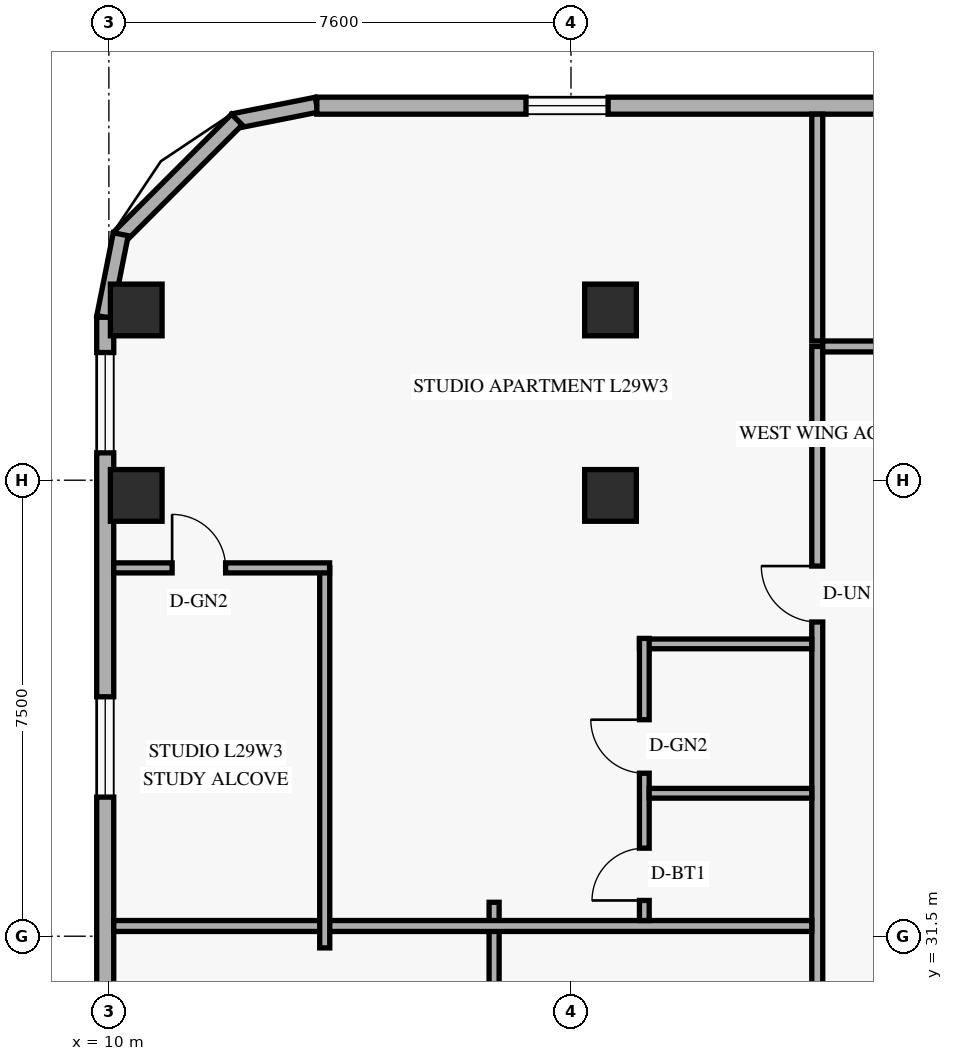
"""IFC4 building model, lengths in metres.
Left out: names, types, materials, properties, quantities, classifications, styles, units other than length and angle.
Written with IfcOpenShell. Run it as: python <this file> out.ifc"""

import sys

from ifc_helpers import new_model, si_unit, direction, frame, frame_2d, origin, origin_2d, place, context, subcontext, project, spatial, rectangle, extrude, element, fill, save


model = new_model("IFC4")
c1 = context("Model", 3, precision=1e-05, world=origin(), true_north=direction((0.0, 1.0)))
c2 = subcontext(c1, "Body", "Model", "MODEL_VIEW")
j1 = project(units=[si_unit("LENGTHUNIT", "METRE"), si_unit("PLANEANGLEUNIT", "RADIAN")], contexts=[c1])
p1 = place(None, origin())
s1 = spatial("IfcSite", under=j1, at=p1, CompositionType="ELEMENT")
p2 = place(p1, origin())
s2 = spatial("IfcBuilding", under=s1, at=p2, CompositionType="ELEMENT")
p3 = place(p2, frame((0.0, 0.0, 113.4)))
s3 = spatial("IfcBuildingStorey", under=s2, at=p3, CompositionType="ELEMENT", Elevation=113.4)
for number, where, z_axis, x_axis in (
    (1, (10.45, 38.75, 0.0), (0.0, 0.0, 1.0), (1.0, 0.0, 0.0)),
    (2, (10.45, 41.8, 0.0), (0.0, 0.0, 1.0), (1.0, 0.0, 0.0)),
    (3, (18.25, 38.75, 0.0), (0.0, 0.0, 1.0), (1.0, 0.0, 0.0)),
    (4, (18.25, 41.8, 0.0), (0.0, 0.0, 1.0), (1.0, 0.0, 0.0)),
):
    element("IfcColumn", number, at=place(p3, frame(where, z_axis=z_axis, x_axis=x_axis)), inside=s3, PredefinedType="COLUMN", context=c2, shape_type="SweptSolid", body=[
        extrude(rectangle(XDim=0.85, YDim=0.85, at=origin_2d()), origin(), (0.0, 0.0, 1.0), 3.6),
    ])
p4 = place(p3, frame((13.417, 45.176, 0.0), z_axis=(0.0, 0.0, 1.0), x_axis=(-0.980809899341, -0.19496651342, 0.0)))
e5 = element("IfcWall", 5, at=p4, inside=s3, PredefinedType="SOLIDWALL", context=c2, shape_type="SweptSolid", body=[
    extrude(rectangle(XDim=1.389, YDim=0.25, at=frame_2d((0.694, 0.0))), origin(), (0.0, 0.0, 1.0), 3.35),
])
p5 = place(p3, frame((12.105, 44.932, 0.0), z_axis=(0.0, 0.0, 1.0), x_axis=(-0.707151344399, -0.707062215165, 0.0)))
e6 = element("IfcWall", 6, at=p5, inside=s3, PredefinedType="SOLIDWALL", context=c2, shape_type="SweptSolid", body=[
    extrude(rectangle(XDim=2.739, YDim=0.25, at=frame_2d((1.37, 0.0))), origin(), (0.0, 0.0, 1.0), 3.35),
])
p6 = place(p3, frame((10.195, 43.045, 0.0), z_axis=(0.0, 0.0, 1.0), x_axis=(-0.195000137217, -0.980803214965, 0.0)))
e7 = element("IfcWall", 7, at=p6, inside=s3, PredefinedType="SOLIDWALL", context=c2, shape_type="SweptSolid", body=[
    extrude(rectangle(XDim=1.388, YDim=0.25, at=frame_2d((0.694, 0.0))), origin(), (0.0, 0.0, 1.0), 3.35),
])
p7 = place(p3, frame((49.98, 45.16, 0.0), z_axis=(0.0, 0.0, 1.0), x_axis=(-1.0, 0.0, 0.0)))
e8 = element("IfcWall", 8, at=p7, inside=s3, PredefinedType="SOLIDWALL", context=c2, shape_type="SweptSolid", body=[
    extrude(rectangle(XDim=36.56, YDim=0.28, at=frame_2d((18.28, 0.0))), origin(), (0.0, 0.0, 1.0), 3.35),
])
p8 = place(p7, frame((31.77, 0.0, 0.85)))
e9 = element("IfcOpeningElement", 9, at=p8, cuts=e8, PredefinedType="OPENING", context=c2, shape_type="SweptSolid", body=[
    extrude(rectangle(XDim=1.35, YDim=1.55, at=frame_2d((0.675, 0.775))), frame((0.0, 0.15, 0.0), z_axis=(0.0, -1.0, 0.0), x_axis=(1.0, 0.0, 0.0)), (0.0, 0.0, 1.0), 0.3),
])
p9 = place(p7, frame((23.28, 0.0, 0.85)))
e10 = element("IfcOpeningElement", 10, at=p9, cuts=e8, PredefinedType="OPENING", context=c2, shape_type="SweptSolid", body=[
    extrude(rectangle(XDim=1.35, YDim=1.55, at=frame_2d((0.675, 0.775))), frame((0.0, 0.15, 0.0), z_axis=(0.0, -1.0, 0.0), x_axis=(1.0, 0.0, 0.0)), (0.0, 0.0, 1.0), 0.3),
])
p10 = place(p7, frame((16.395, 0.0, 0.85)))
e11 = element("IfcOpeningElement", 11, at=p10, cuts=e8, PredefinedType="OPENING", context=c2, shape_type="SweptSolid", body=[
    extrude(rectangle(XDim=1.35, YDim=1.55, at=frame_2d((0.675, 0.775))), frame((0.0, 0.15, 0.0), z_axis=(0.0, -1.0, 0.0), x_axis=(1.0, 0.0, 0.0)), (0.0, 0.0, 1.0), 0.3),
])
p11 = place(p7, frame((10.79, 0.0, 0.85)))
e12 = element("IfcOpeningElement", 12, at=p11, cuts=e8, PredefinedType="OPENING", context=c2, shape_type="SweptSolid", body=[
    extrude(rectangle(XDim=1.35, YDim=1.55, at=frame_2d((0.675, 0.775))), frame((0.0, 0.15, 0.0), z_axis=(0.0, -1.0, 0.0), x_axis=(1.0, 0.0, 0.0)), (0.0, 0.0, 1.0), 0.3),
])
p12 = place(p7, frame((5.7, 0.0, 0.85)))
e13 = element("IfcOpeningElement", 13, at=p12, cuts=e8, PredefinedType="OPENING", context=c2, shape_type="SweptSolid", body=[
    extrude(rectangle(XDim=1.35, YDim=1.55, at=frame_2d((0.675, 0.775))), frame((0.0, 0.15, 0.0), z_axis=(0.0, -1.0, 0.0), x_axis=(1.0, 0.0, 0.0)), (0.0, 0.0, 1.0), 0.3),
])
p13 = place(p7, frame((2.88, 0.0, 0.85)))
e14 = element("IfcOpeningElement", 14, at=p13, cuts=e8, PredefinedType="OPENING", context=c2, shape_type="SweptSolid", body=[
    extrude(rectangle(XDim=1.2, YDim=1.5, at=frame_2d((0.6, 0.75))), frame((0.0, 0.15, 0.0), z_axis=(0.0, -1.0, 0.0), x_axis=(1.0, 0.0, 0.0)), (0.0, 0.0, 1.0), 0.3),
])
p14 = place(p7, frame((0.615, 0.0, 0.85)))
e15 = element("IfcOpeningElement", 15, at=p14, cuts=e8, PredefinedType="OPENING", context=c2, shape_type="SweptSolid", body=[
    extrude(rectangle(XDim=1.35, YDim=1.55, at=frame_2d((0.675, 0.775))), frame((0.0, 0.15, 0.0), z_axis=(0.0, -1.0, 0.0), x_axis=(1.0, 0.0, 0.0)), (0.0, 0.0, 1.0), 0.3),
])
p15 = place(p3, frame((9.94, 41.68, 0.0), z_axis=(0.0, 0.0, 1.0), x_axis=(0.0, -1.0, 0.0)))
e16 = element("IfcWall", 16, at=p15, inside=s3, PredefinedType="SOLIDWALL", context=c2, shape_type="SweptSolid", body=[
    extrude(rectangle(XDim=35.36, YDim=0.28, at=frame_2d((17.68, 0.0))), origin(), (0.0, 0.0, 1.0), 3.35),
])
p16 = place(p15, frame((27.455, 0.0, 0.85)))
e17 = element("IfcOpeningElement", 17, at=p16, cuts=e16, PredefinedType="OPENING", context=c2, shape_type="SweptSolid", body=[
    extrude(rectangle(XDim=1.65, YDim=1.6, at=frame_2d((0.825, 0.8))), frame((0.0, 0.15, 0.0), z_axis=(0.0, -1.0, 0.0), x_axis=(1.0, 0.0, 0.0)), (0.0, 0.0, 1.0), 0.3),
])
p17 = place(p15, frame((21.286, 0.0, 0.85)))
e18 = element("IfcOpeningElement", 18, at=p17, cuts=e16, PredefinedType="OPENING", context=c2, shape_type="SweptSolid", body=[
    extrude(rectangle(XDim=1.65, YDim=1.6, at=frame_2d((0.825, 0.8))), frame((0.0, 0.15, 0.0), z_axis=(0.0, -1.0, 0.0), x_axis=(1.0, 0.0, 0.0)), (0.0, 0.0, 1.0), 0.3),
])
p18 = place(p15, frame((16.267, 0.0, 0.85)))
e19 = element("IfcOpeningElement", 19, at=p18, cuts=e16, PredefinedType="OPENING", context=c2, shape_type="SweptSolid", body=[
    extrude(rectangle(XDim=1.65, YDim=1.6, at=frame_2d((0.825, 0.8))), frame((0.0, 0.15, 0.0), z_axis=(0.0, -1.0, 0.0), x_axis=(1.0, 0.0, 0.0)), (0.0, 0.0, 1.0), 0.3),
])
p19 = place(p15, frame((12.186, 0.0, 0.85)))
e20 = element("IfcOpeningElement", 20, at=p19, cuts=e16, PredefinedType="OPENING", context=c2, shape_type="SweptSolid", body=[
    extrude(rectangle(XDim=1.2, YDim=1.5, at=frame_2d((0.6, 0.75))), frame((0.0, 0.15, 0.0), z_axis=(0.0, -1.0, 0.0), x_axis=(1.0, 0.0, 0.0)), (0.0, 0.0, 1.0), 0.3),
])
p20 = place(p15, frame((6.242, 0.0, 0.85)))
e21 = element("IfcOpeningElement", 21, at=p20, cuts=e16, PredefinedType="OPENING", context=c2, shape_type="SweptSolid", body=[
    extrude(rectangle(XDim=1.65, YDim=1.6, at=frame_2d((0.825, 0.8))), frame((0.0, 0.15, 0.0), z_axis=(0.0, -1.0, 0.0), x_axis=(1.0, 0.0, 0.0)), (0.0, 0.0, 1.0), 0.3),
])
p21 = place(p15, frame((0.58, 0.0, 0.85)))
e22 = element("IfcOpeningElement", 22, at=p21, cuts=e16, PredefinedType="OPENING", context=c2, shape_type="SweptSolid", body=[
    extrude(rectangle(XDim=1.65, YDim=1.6, at=frame_2d((0.825, 0.8))), frame((0.0, 0.15, 0.0), z_axis=(0.0, -1.0, 0.0), x_axis=(1.0, 0.0, 0.0)), (0.0, 0.0, 1.0), 0.3),
])
p22 = place(p3, frame((21.65, 6.8, 0.0), z_axis=(0.0, 0.0, 1.0), x_axis=(0.0, 1.0, 0.0)))
e23 = element("IfcWall", 23, at=p22, inside=s3, PredefinedType="STANDARD", context=c2, shape_type="SweptSolid", body=[
    extrude(rectangle(XDim=34.4, YDim=0.18, at=frame_2d((17.2, 0.0))), origin(), (0.0, 0.0, 1.0), 2.721),
])
p23 = place(p22, frame((4.444, 0.0, 0.0)))
e24 = element("IfcOpeningElement", 24, at=p23, cuts=e23, PredefinedType="OPENING", context=c2, shape_type="SweptSolid", body=[
    extrude(rectangle(XDim=0.92, YDim=2.15, at=frame_2d((0.46, 1.075))), frame((0.0, 0.1, 0.0), z_axis=(0.0, -1.0, 0.0), x_axis=(1.0, 0.0, 0.0)), (0.0, 0.0, 1.0), 0.2),
])
p24 = place(p22, frame((15.192, 0.0, 0.0)))
e25 = element("IfcOpeningElement", 25, at=p24, cuts=e23, PredefinedType="OPENING", context=c2, shape_type="SweptSolid", body=[
    extrude(rectangle(XDim=0.92, YDim=2.15, at=frame_2d((0.46, 1.075))), frame((0.0, 0.1, 0.0), z_axis=(0.0, -1.0, 0.0), x_axis=(1.0, 0.0, 0.0)), (0.0, 0.0, 1.0), 0.2),
])
p25 = place(p22, frame((29.868, 0.0, 0.0)))
e26 = element("IfcOpeningElement", 26, at=p25, cuts=e23, PredefinedType="OPENING", context=c2, shape_type="SweptSolid", body=[
    extrude(rectangle(XDim=0.92, YDim=2.15, at=frame_2d((0.46, 1.075))), frame((0.0, 0.1, 0.0), z_axis=(0.0, -1.0, 0.0), x_axis=(1.0, 0.0, 0.0)), (0.0, 0.0, 1.0), 0.2),
])
p26 = place(p3, frame((21.74, 41.2, 0.0), z_axis=(0.0, 0.0, 1.0), x_axis=(1.0, 0.0, 0.0)))
e27 = element("IfcWall", 27, at=p26, inside=s3, PredefinedType="STANDARD", context=c2, shape_type="SweptSolid", body=[
    extrude(rectangle(XDim=13.68, YDim=0.18, at=frame_2d((6.84, 0.0))), origin(), (0.0, 0.0, 1.0), 2.721),
])
p27 = place(p26, frame((3.09, 0.0, 0.0)))
e28 = element("IfcOpeningElement", 28, at=p27, cuts=e27, PredefinedType="OPENING", context=c2, shape_type="SweptSolid", body=[
    extrude(rectangle(XDim=0.95, YDim=2.15, at=frame_2d((0.475, 1.075))), frame((0.0, 0.1, 0.0), z_axis=(0.0, -1.0, 0.0), x_axis=(1.0, 0.0, 0.0)), (0.0, 0.0, 1.0), 0.2),
])
p28 = place(p26, frame((10.11, 0.0, 0.0)))
e29 = element("IfcOpeningElement", 29, at=p28, cuts=e27, PredefinedType="OPENING", context=c2, shape_type="SweptSolid", body=[
    extrude(rectangle(XDim=0.95, YDim=2.15, at=frame_2d((0.475, 1.075))), frame((0.0, 0.1, 0.0), z_axis=(0.0, -1.0, 0.0), x_axis=(1.0, 0.0, 0.0)), (0.0, 0.0, 1.0), 0.2),
])
p29 = place(p3, frame((21.65, 41.29, 0.0), z_axis=(0.0, 0.0, 1.0), x_axis=(0.0, 1.0, 0.0)))
e30 = element("IfcWall", 30, at=p29, inside=s3, PredefinedType="PARTITIONING", context=c2, shape_type="SweptSolid", body=[
    extrude(rectangle(XDim=3.73, YDim=0.18, at=frame_2d((1.865, 0.0))), origin(), (0.0, 0.0, 1.0), 2.799),
])
p30 = place(p3, frame((16.335, 27.948, 0.0), z_axis=(0.0, 0.0, 1.0), x_axis=(0.0, 1.0, 0.0)))
e31 = element("IfcWall", 31, at=p30, inside=s3, PredefinedType="PARTITIONING", context=c2, shape_type="SweptSolid", body=[
    extrude(rectangle(XDim=4.11, YDim=0.165, at=frame_2d((2.055, 0.0))), origin(), (0.0, 0.0, 1.0), 2.721),
])
p31 = place(p3, frame((10.08, 31.668, 0.0), z_axis=(0.0, 0.0, 1.0), x_axis=(1.0, 0.0, 0.0)))
e32 = element("IfcWall", 32, at=p31, inside=s3, PredefinedType="PARTITIONING", context=c2, shape_type="SweptSolid", body=[
    extrude(rectangle(XDim=11.48, YDim=0.18, at=frame_2d((5.74, 0.0))), origin(), (0.0, 0.0, 1.0), 2.721),
])
p32 = place(p3, frame((18.726, 36.308, 0.0), z_axis=(0.0, 0.0, 1.0), x_axis=(1.0, 0.0, 0.0)))
e33 = element("IfcWall", 33, at=p32, inside=s3, PredefinedType="PLUMBINGWALL", context=c2, shape_type="SweptSolid", body=[
    extrude(rectangle(XDim=2.834, YDim=0.16, at=frame_2d((1.417, 0.0))), origin(), (0.0, 0.0, 1.0), 3.35),
])
p33 = place(p3, frame((18.806, 31.758, 0.0), z_axis=(0.0, 0.0, 1.0), x_axis=(0.0, 1.0, 0.0)))
e34 = element("IfcWall", 34, at=p33, inside=s3, PredefinedType="PLUMBINGWALL", context=c2, shape_type="SweptSolid", body=[
    extrude(rectangle(XDim=4.64, YDim=0.16, at=frame_2d((2.32, 0.0))), origin(), (0.0, 0.0, 1.0), 2.978),
])
p34 = place(p33, frame((0.33, 0.0, 0.0)))
e35 = element("IfcOpeningElement", 35, at=p34, cuts=e34, PredefinedType="OPENING", context=c2, shape_type="SweptSolid", body=[
    extrude(rectangle(XDim=0.86, YDim=2.12, at=frame_2d((0.43, 1.06))), frame((0.0, 0.09, 0.0), z_axis=(0.0, -1.0, 0.0), x_axis=(1.0, 0.0, 0.0)), (0.0, 0.0, 1.0), 0.18),
])
p35 = place(p33, frame((2.423, 0.0, 0.0)))
e36 = element("IfcOpeningElement", 36, at=p35, cuts=e34, PredefinedType="OPENING", context=c2, shape_type="SweptSolid", body=[
    extrude(rectangle(XDim=0.88, YDim=2.12, at=frame_2d((0.44, 1.06))), frame((0.0, 0.09, 0.0), z_axis=(0.0, -1.0, 0.0), x_axis=(1.0, 0.0, 0.0)), (0.0, 0.0, 1.0), 0.18),
])
p36 = place(p3, frame((18.886, 33.851, 0.0), z_axis=(0.0, 0.0, 1.0), x_axis=(1.0, 0.0, 0.0)))
e37 = element("IfcWall", 37, at=p36, inside=s3, PredefinedType="PLUMBINGWALL", context=c2, shape_type="SweptSolid", body=[
    extrude(rectangle(XDim=2.674, YDim=0.16, at=frame_2d((1.337, 0.0))), origin(), (0.0, 0.0, 1.0), 3.35),
])
p37 = place(p3, frame((13.55, 31.308, 0.0), z_axis=(0.0, 0.0, 1.0), x_axis=(0.0, 1.0, 0.0)))
e38 = element("IfcWall", 38, at=p37, inside=s3, PredefinedType="PARTITIONING", context=c2, shape_type="SweptSolid", body=[
    extrude(rectangle(XDim=6.25, YDim=0.165, at=frame_2d((3.125, 0.0))), origin(), (0.0, 0.0, 1.0), 2.978),
])
p38 = place(p3, frame((10.08, 37.558, 0.0), z_axis=(0.0, 0.0, 1.0), x_axis=(1.0, 0.0, 0.0)))
e39 = element("IfcWall", 39, at=p38, inside=s3, PredefinedType="PARTITIONING", context=c2, shape_type="SweptSolid", body=[
    extrude(rectangle(XDim=3.55, YDim=0.165, at=frame_2d((1.775, 0.0))), origin(), (0.0, 0.0, 1.0), 2.799),
])
p39 = place(p38, frame((0.96, 0.0, 0.0)))
e40 = element("IfcOpeningElement", 40, at=p39, cuts=e39, PredefinedType="OPENING", context=c2, shape_type="SweptSolid", body=[
    extrude(rectangle(XDim=0.88, YDim=2.12, at=frame_2d((0.44, 1.06))), frame((0.0, 0.093, 0.0), z_axis=(0.0, -1.0, 0.0), x_axis=(1.0, 0.0, 0.0)), (0.0, 0.0, 1.0), 0.185),
])
p40 = place(p8, origin())
e41 = element("IfcWindow", 41, at=p40, inside=s3, PartitioningType="SINGLE_PANEL", PredefinedType="WINDOW", context=c2, shape_type="SweptSolid", body=[
    extrude(rectangle(XDim=1.35, YDim=1.55, at=frame_2d((0.675, 0.775))), frame((0.0, 0.03, 0.0), z_axis=(0.0, -1.0, 0.0), x_axis=(1.0, 0.0, 0.0)), (0.0, 0.0, 1.0), 0.06),
])
fill(e9, e41)
p41 = place(p20, origin())
e42 = element("IfcWindow", 42, at=p41, inside=s3, PartitioningType="SINGLE_PANEL", PredefinedType="WINDOW", context=c2, shape_type="SweptSolid", body=[
    extrude(rectangle(XDim=1.65, YDim=1.6, at=frame_2d((0.825, 0.8))), frame((0.0, 0.03, 0.0), z_axis=(0.0, -1.0, 0.0), x_axis=(1.0, 0.0, 0.0)), (0.0, 0.0, 1.0), 0.06),
])
fill(e21, e42)
p42 = place(p21, origin())
e43 = element("IfcWindow", 43, at=p42, inside=s3, PartitioningType="SINGLE_PANEL", PredefinedType="WINDOW", context=c2, shape_type="SweptSolid", body=[
    extrude(rectangle(XDim=1.65, YDim=1.6, at=frame_2d((0.825, 0.8))), frame((0.0, 0.03, 0.0), z_axis=(0.0, -1.0, 0.0), x_axis=(1.0, 0.0, 0.0)), (0.0, 0.0, 1.0), 0.06),
])
fill(e22, e43)
p43 = place(p39, origin())
e44 = element("IfcDoor", 44, at=p43, inside=s3, OperationType="SINGLE_SWING_LEFT", PredefinedType="DOOR", context=c2, shape_type="SweptSolid", body=[
    extrude(rectangle(XDim=0.88, YDim=2.12, at=frame_2d((0.44, 1.06))), frame((0.0, 0.025, 0.0), z_axis=(0.0, -1.0, 0.0), x_axis=(1.0, 0.0, 0.0)), (0.0, 0.0, 1.0), 0.05),
])
fill(e40, e44)
p44 = place(p25, origin())
e45 = element("IfcDoor", 45, at=p44, inside=s3, OperationType="SINGLE_SWING_RIGHT", PredefinedType="DOOR", context=c2, shape_type="SweptSolid", body=[
    extrude(rectangle(XDim=0.92, YDim=2.15, at=frame_2d((0.46, 1.075))), frame((0.0, 0.025, 0.0), z_axis=(0.0, -1.0, 0.0), x_axis=(1.0, 0.0, 0.0)), (0.0, 0.0, 1.0), 0.05),
])
fill(e26, e45)
p45 = place(p34, origin())
e46 = element("IfcDoor", 46, at=p45, inside=s3, OperationType="SINGLE_SWING_LEFT", PredefinedType="DOOR", context=c2, shape_type="SweptSolid", body=[
    extrude(rectangle(XDim=0.86, YDim=2.12, at=frame_2d((0.43, 1.06))), frame((0.0, 0.025, 0.0), z_axis=(0.0, -1.0, 0.0), x_axis=(1.0, 0.0, 0.0)), (0.0, 0.0, 1.0), 0.05),
])
fill(e35, e46)
p46 = place(p35, origin())
e47 = element("IfcDoor", 47, at=p46, inside=s3, OperationType="SINGLE_SWING_RIGHT", PredefinedType="DOOR", context=c2, shape_type="SweptSolid", body=[
    extrude(rectangle(XDim=0.88, YDim=2.12, at=frame_2d((0.44, 1.06))), frame((0.0, 0.025, 0.0), z_axis=(0.0, -1.0, 0.0), x_axis=(1.0, 0.0, 0.0)), (0.0, 0.0, 1.0), 0.05),
])
fill(e36, e47)
save(model, sys.argv[1])
